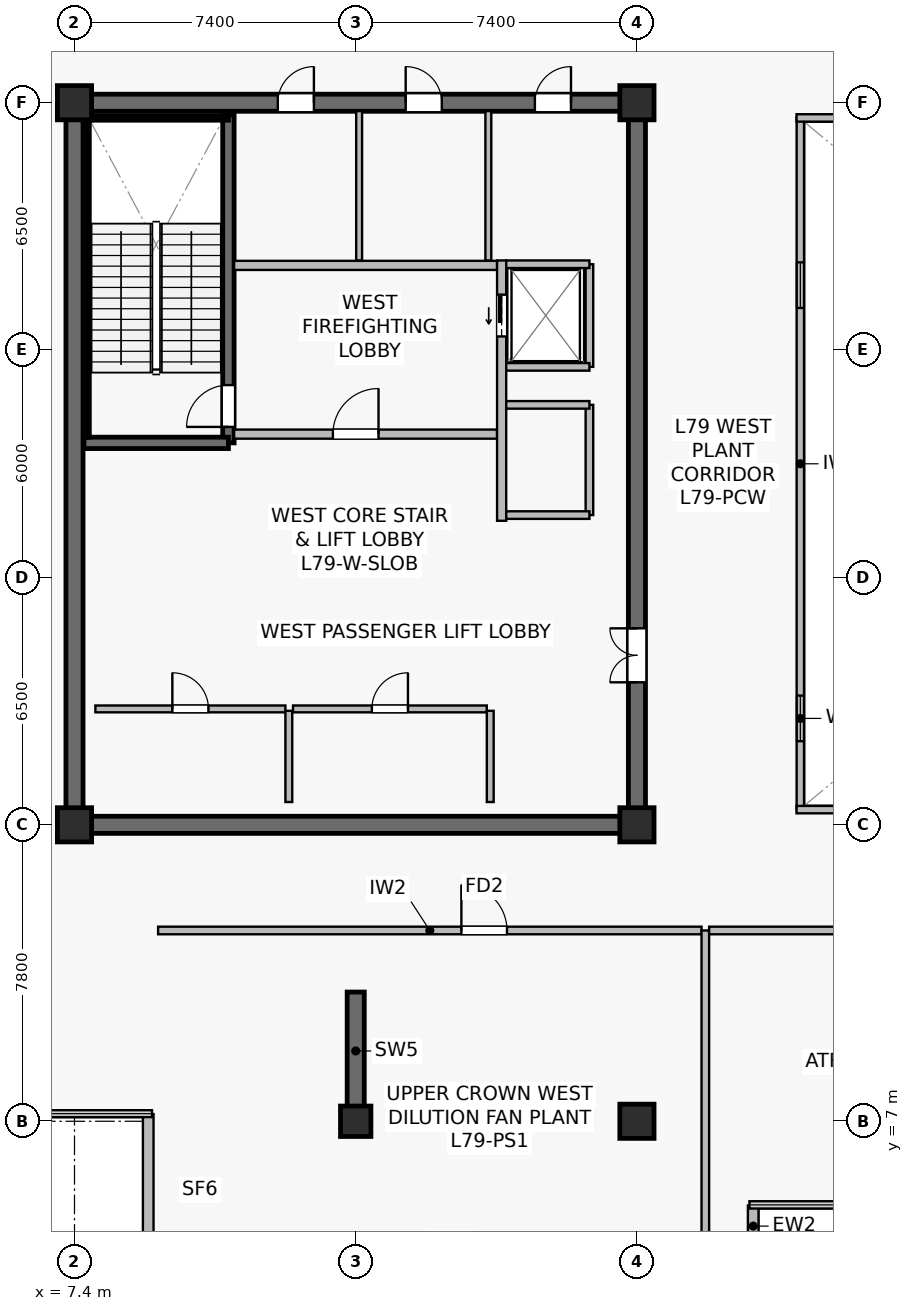
"""IFC4 building model, lengths in metres.
Left out: names, types, materials, properties, quantities, classifications, styles, units other than length and angle.
Written with IfcOpenShell. Run it as: python <this file> out.ifc"""

import sys

from ifc_helpers import new_model, si_unit, direction, frame, frame_2d, origin, origin_2d, place, context, subcontext, project, spatial, rectangle, extrude, source, transform, mapped, element, fill, save


model = new_model("IFC4")
c1 = context("Model", 3, precision=1e-05, world=origin(), true_north=direction((0.0, 1.0)))
c2 = subcontext(c1, "Body", "Model", "MODEL_VIEW")
j1 = project(units=[si_unit("LENGTHUNIT", "METRE"), si_unit("PLANEANGLEUNIT", "RADIAN")], contexts=[c1])
p1 = place(None, origin())
s1 = spatial("IfcSite", under=j1, at=p1, CompositionType="ELEMENT")
p2 = place(p1, origin())
s2 = spatial("IfcBuilding", under=s1, at=p2, CompositionType="ELEMENT")
p3 = place(p2, frame((0.0, 0.0, 332.4)))
s3 = spatial("IfcBuildingStorey", under=s2, at=p3, CompositionType="ELEMENT", Elevation=332.4)
p4 = place(p3, frame((7.175, 14.8, 0.0), z_axis=(0.0, 0.0, 1.0), x_axis=(1.0, 0.0, 0.0)))
e1 = element("IfcWall", 1, at=p4, inside=s3, PredefinedType="SHEAR", context=c2, shape_type="SweptSolid", body=[
    extrude(rectangle(XDim=15.25, YDim=0.45, at=frame_2d((7.625, 0.0))), origin(), (0.0, 0.0, 1.0), 5.12),
])
p5 = place(p3, frame((7.175, 33.8, 0.0), z_axis=(0.0, 0.0, 1.0), x_axis=(1.0, 0.0, 0.0)))
e2 = element("IfcWall", 2, at=p5, inside=s3, PredefinedType="SHEAR", context=c2, shape_type="SweptSolid", body=[
    extrude(rectangle(XDim=15.25, YDim=0.45, at=frame_2d((7.625, 0.0))), origin(), (0.0, 0.0, 1.0), 5.12),
])
p6 = place(p5, frame((5.575, 0.0, 0.0)))
e3 = element("IfcOpeningElement", 3, at=p6, cuts=e2, PredefinedType="OPENING", context=c2, shape_type="SweptSolid", body=[
    extrude(rectangle(XDim=0.95, YDim=2.15, at=frame_2d((0.475, 1.075))), frame((0.0, 0.235, 0.0), z_axis=(0.0, -1.0, 0.0), x_axis=(1.0, 0.0, 0.0)), (0.0, 0.0, 1.0), 0.47),
])
p7 = place(p5, frame((8.94, 0.0, 0.0)))
e4 = element("IfcOpeningElement", 4, at=p7, cuts=e2, PredefinedType="OPENING", context=c2, shape_type="SweptSolid", body=[
    extrude(rectangle(XDim=0.95, YDim=2.15, at=frame_2d((0.475, 1.075))), frame((0.0, 0.235, 0.0), z_axis=(0.0, -1.0, 0.0), x_axis=(1.0, 0.0, 0.0)), (0.0, 0.0, 1.0), 0.47),
])
p8 = place(p5, frame((12.34, 0.0, 0.0)))
e5 = element("IfcOpeningElement", 5, at=p8, cuts=e2, PredefinedType="OPENING", context=c2, shape_type="SweptSolid", body=[
    extrude(rectangle(XDim=0.95, YDim=2.15, at=frame_2d((0.475, 1.075))), frame((0.0, 0.235, 0.0), z_axis=(0.0, -1.0, 0.0), x_axis=(1.0, 0.0, 0.0)), (0.0, 0.0, 1.0), 0.47),
])
p9 = place(p3, frame((7.4, 15.025, 0.0), z_axis=(0.0, 0.0, 1.0), x_axis=(0.0, 1.0, 0.0)))
e6 = element("IfcWall", 6, at=p9, inside=s3, PredefinedType="SHEAR", context=c2, shape_type="SweptSolid", body=[
    extrude(rectangle(XDim=18.55, YDim=0.45, at=frame_2d((9.275, 0.0))), origin(), (0.0, 0.0, 1.0), 5.12),
])
p10 = place(p3, frame((22.2, 15.025, 0.0), z_axis=(0.0, 0.0, 1.0), x_axis=(0.0, 1.0, 0.0)))
e7 = element("IfcWall", 7, at=p10, inside=s3, PredefinedType="SHEAR", context=c2, shape_type="SweptSolid", body=[
    extrude(rectangle(XDim=18.55, YDim=0.45, at=frame_2d((9.275, 0.0))), origin(), (0.0, 0.0, 1.0), 5.12),
])
p11 = place(p10, frame((3.525, 0.0, 0.0)))
e8 = element("IfcOpeningElement", 8, at=p11, cuts=e7, PredefinedType="OPENING", context=c2, shape_type="SweptSolid", body=[
    extrude(rectangle(XDim=1.42, YDim=2.2, at=frame_2d((0.71, 1.1))), frame((0.0, 0.235, 0.0), z_axis=(0.0, -1.0, 0.0), x_axis=(1.0, 0.0, 0.0)), (0.0, 0.0, 1.0), 0.47),
])
p12 = place(p3, frame((11.45, 24.85, 0.0), z_axis=(0.0, 0.0, 1.0), x_axis=(0.0, 1.0, 0.0)))
e9 = element("IfcWall", 9, at=p12, inside=s3, PredefinedType="SHEAR", context=c2, shape_type="SweptSolid", body=[
    extrude(rectangle(XDim=8.63, YDim=0.3, at=frame_2d((4.315, 0.0))), origin(), (0.0, 0.0, 1.0), 5.12),
])
p13 = place(p12, frame((0.42, 0.0, 0.0)))
e10 = element("IfcOpeningElement", 10, at=p13, cuts=e9, PredefinedType="OPENING", context=c2, shape_type="SweptSolid", body=[
    extrude(rectangle(XDim=1.1, YDim=2.15, at=frame_2d((0.55, 1.075))), frame((0.0, 0.16, 0.0), z_axis=(0.0, -1.0, 0.0), x_axis=(1.0, 0.0, 0.0)), (0.0, 0.0, 1.0), 0.32),
])
p14 = place(p3, frame((7.65, 24.85, 0.0), z_axis=(0.0, 0.0, 1.0), x_axis=(1.0, 0.0, 0.0)))
e11 = element("IfcWall", 11, at=p14, inside=s3, PredefinedType="SHEAR", context=c2, shape_type="SweptSolid", body=[
    extrude(rectangle(XDim=3.8, YDim=0.3, at=frame_2d((1.9, 0.0))), origin(), (0.0, 0.0, 1.0), 5.12),
])
p15 = place(p3, frame((7.73, 33.4, 0.0), z_axis=(0.0, 0.0, 1.0), x_axis=(1.0, 0.0, 0.0)))
e12 = element("IfcWall", 12, at=p15, inside=s3, PredefinedType="SOLIDWALL", context=c2, shape_type="SweptSolid", body=[
    extrude(rectangle(XDim=3.72, YDim=0.12, at=frame_2d((1.86, 0.0))), origin(), (0.0, 0.0, 1.0), 5.12),
])
p16 = place(p3, frame((7.73, 25.0, 0.0), z_axis=(0.0, 0.0, 1.0), x_axis=(0.0, 1.0, 0.0)))
e13 = element("IfcWall", 13, at=p16, inside=s3, PredefinedType="SOLIDWALL", context=c2, shape_type="SweptSolid", body=[
    extrude(rectangle(XDim=8.32, YDim=0.12, at=frame_2d((4.16, 0.0))), origin(), (0.0, 0.0, 1.0), 5.12),
])
p17 = place(p3, frame((14.8, 7.3, 0.0), z_axis=(0.0, 0.0, 1.0), x_axis=(0.0, 1.0, 0.0)))
e14 = element("IfcWall", 14, at=p17, inside=s3, PredefinedType="SHEAR", context=c2, shape_type="SweptSolid", body=[
    extrude(rectangle(XDim=3.1, YDim=0.45, at=frame_2d((1.55, 0.0))), origin(), (0.0, 0.0, 1.0), 5.12),
])
m1 = source(origin(), c2, "Body", "SweptSolid", [
    extrude(rectangle(XDim=0.8, YDim=0.8, at=origin_2d()), origin(), (0.0, 0.0, 1.0), 5.4),
])
p18 = place(p3, frame((14.8, 7.0, 0.0), z_axis=(0.0, 0.0, 1.0), x_axis=(1.0, 0.0, 0.0)))
e15 = element("IfcColumn", 15, at=p18, inside=s3, PredefinedType="COLUMN", context=c2, shape_type="MappedRepresentation", body=[
    mapped(m1, transform((0.0, 0.0, 0.0), scale=1.0)),
])
m2 = source(origin(), c2, "Body", "SweptSolid", [
    extrude(rectangle(XDim=0.9, YDim=0.9, at=origin_2d()), origin(), (0.0, 0.0, 1.0), 5.4),
])
for number, where, z_axis, x_axis in (
    (16, (22.2, 7.0, 0.0), (0.0, 0.0, 1.0), (1.0, 0.0, 0.0)),
    (17, (7.4, 14.8, 0.0), (0.0, 0.0, 1.0), (1.0, 0.0, 0.0)),
    (18, (22.2, 14.8, 0.0), (0.0, 0.0, 1.0), (1.0, 0.0, 0.0)),
    (19, (7.4, 33.8, 0.0), (0.0, 0.0, 1.0), (1.0, 0.0, 0.0)),
    (20, (22.2, 33.8, 0.0), (0.0, 0.0, 1.0), (1.0, 0.0, 0.0)),
):
    element("IfcColumn", number, at=place(p3, frame(where, z_axis=z_axis, x_axis=x_axis)), inside=s3, PredefinedType="COLUMN", context=c2, shape_type="MappedRepresentation", body=[
        mapped(m2, transform((0.0, 0.0, 0.0), scale=1.0)),
    ])
p19 = place(p3, frame((25.26, 3.7, 0.0), z_axis=(0.0, 0.0, 1.0), x_axis=(0.0, 1.0, 0.0)))
e21 = element("IfcWall", 21, at=p19, inside=s3, PredefinedType="STANDARD", context=c2, shape_type="SweptSolid", body=[
    extrude(rectangle(XDim=1.083, YDim=0.28, at=frame_2d((0.542, 0.0))), origin(), (0.0, 0.0, 1.0), 5.12),
])
p20 = place(p3, frame((9.34, 7.188, 0.0), z_axis=(0.0, 0.0, 1.0), x_axis=(0.0, -1.0, 0.0)))
e22 = element("IfcWall", 22, at=p20, inside=s3, PredefinedType="STANDARD", context=c2, shape_type="SweptSolid", body=[
    extrude(rectangle(XDim=3.488, YDim=0.28, at=frame_2d((1.744, 0.0))), origin(), (0.0, 0.0, 1.0), 5.12),
])
p21 = place(p3, frame((11.6, 25.08, 0.0), z_axis=(0.0, 0.0, 1.0), x_axis=(1.0, 0.0, 0.0)))
e23 = element("IfcWall", 23, at=p21, inside=s3, PredefinedType="SOLIDWALL", context=c2, shape_type="SweptSolid", body=[
    extrude(rectangle(XDim=6.92, YDim=0.24, at=frame_2d((3.46, 0.0))), origin(), (0.0, 0.0, 1.0), 4.355),
])
p22 = place(p21, frame((2.6, 0.0, 0.0)))
e24 = element("IfcOpeningElement", 24, at=p22, cuts=e23, PredefinedType="OPENING", context=c2, shape_type="SweptSolid", body=[
    extrude(rectangle(XDim=1.2, YDim=2.16, at=frame_2d((0.6, 1.08))), frame((0.0, 0.13, 0.0), z_axis=(0.0, -1.0, 0.0), x_axis=(1.0, 0.0, 0.0)), (0.0, 0.0, 1.0), 0.26),
])
p23 = place(p3, frame((11.6, 29.52, 0.0), z_axis=(0.0, 0.0, 1.0), x_axis=(1.0, 0.0, 0.0)))
e25 = element("IfcWall", 25, at=p23, inside=s3, PredefinedType="SOLIDWALL", context=c2, shape_type="SweptSolid", body=[
    extrude(rectangle(XDim=6.92, YDim=0.24, at=frame_2d((3.46, 0.0))), origin(), (0.0, 0.0, 1.0), 4.355),
])
p24 = place(p3, frame((18.64, 22.8, 0.0), z_axis=(0.0, 0.0, 1.0), x_axis=(0.0, 1.0, 0.0)))
e26 = element("IfcWall", 26, at=p24, inside=s3, PredefinedType="SOLIDWALL", context=c2, shape_type="SweptSolid", body=[
    extrude(rectangle(XDim=6.85, YDim=0.24, at=frame_2d((3.425, 0.0))), origin(), (0.0, 0.0, 1.0), 4.255),
])
p25 = place(p24, frame((4.85, 0.0, 0.0)))
e27 = element("IfcOpeningElement", 27, at=p25, cuts=e26, PredefinedType="OPENING", context=c2, shape_type="SweptSolid", body=[
    extrude(rectangle(XDim=1.1, YDim=2.22, at=frame_2d((0.55, 1.11))), frame((0.0, 0.13, 0.0), z_axis=(0.0, -1.0, 0.0), x_axis=(1.0, 0.0, 0.0)), (0.0, 0.0, 1.0), 0.26),
])
p26 = place(p3, frame((20.95, 26.85, 0.0), z_axis=(0.0, 0.0, 1.0), x_axis=(0.0, 1.0, 0.0)))
e28 = element("IfcWall", 28, at=p26, inside=s3, PredefinedType="SOLIDWALL", context=c2, shape_type="SweptSolid", body=[
    extrude(rectangle(XDim=2.7, YDim=0.2, at=frame_2d((1.35, 0.0))), origin(), (0.0, 0.0, 1.0), 5.12),
])
p27 = place(p3, frame((18.76, 29.55, 0.0), z_axis=(0.0, 0.0, 1.0), x_axis=(1.0, 0.0, 0.0)))
e29 = element("IfcWall", 29, at=p27, inside=s3, PredefinedType="SOLIDWALL", context=c2, shape_type="SweptSolid", body=[
    extrude(rectangle(XDim=2.19, YDim=0.2, at=frame_2d((1.095, 0.0))), origin(), (0.0, 0.0, 1.0), 5.12),
])
p28 = place(p3, frame((18.76, 26.85, 0.0), z_axis=(0.0, 0.0, 1.0), x_axis=(1.0, 0.0, 0.0)))
e30 = element("IfcWall", 30, at=p28, inside=s3, PredefinedType="SOLIDWALL", context=c2, shape_type="SweptSolid", body=[
    extrude(rectangle(XDim=2.19, YDim=0.2, at=frame_2d((1.095, 0.0))), origin(), (0.0, 0.0, 1.0), 4.517),
])
p29 = place(p3, frame((20.95, 22.95, 0.0), z_axis=(0.0, 0.0, 1.0), x_axis=(0.0, 1.0, 0.0)))
e31 = element("IfcWall", 31, at=p29, inside=s3, PredefinedType="SOLIDWALL", context=c2, shape_type="SweptSolid", body=[
    extrude(rectangle(XDim=2.9, YDim=0.2, at=frame_2d((1.45, 0.0))), origin(), (0.0, 0.0, 1.0), 4.255),
])
for number, where, z_axis, x_axis in (
    (32, (18.76, 25.85, 0.0), (0.0, 0.0, 1.0), (1.0, 0.0, 0.0)),
    (33, (18.76, 22.95, 0.0), (0.0, 0.0, 1.0), (1.0, 0.0, 0.0)),
):
    element("IfcWall", number, at=place(p3, frame(where, z_axis=z_axis, x_axis=x_axis)), inside=s3, PredefinedType="SOLIDWALL", context=c2, shape_type="SweptSolid", body=[
        extrude(rectangle(XDim=2.19, YDim=0.2, at=frame_2d((1.095, 0.0))), origin(), (0.0, 0.0, 1.0), 5.12),
    ])
p30 = place(p3, frame((7.95, 17.85, 0.0), z_axis=(0.0, 0.0, 1.0), x_axis=(1.0, 0.0, 0.0)))
e34 = element("IfcWall", 34, at=p30, inside=s3, PredefinedType="SOLIDWALL", context=c2, shape_type="SweptSolid", body=[
    extrude(rectangle(XDim=5.0, YDim=0.18, at=frame_2d((2.5, 0.0))), origin(), (0.0, 0.0, 1.0), 5.12),
])
p31 = place(p30, frame((2.025, 0.0, 0.0)))
e35 = element("IfcOpeningElement", 35, at=p31, cuts=e34, PredefinedType="OPENING", context=c2, shape_type="SweptSolid", body=[
    extrude(rectangle(XDim=0.95, YDim=2.15, at=frame_2d((0.475, 1.075))), frame((0.0, 0.1, 0.0), z_axis=(0.0, -1.0, 0.0), x_axis=(1.0, 0.0, 0.0)), (0.0, 0.0, 1.0), 0.2),
])
p32 = place(p3, frame((13.04, 15.4, 0.0), z_axis=(0.0, 0.0, 1.0), x_axis=(0.0, 1.0, 0.0)))
e36 = element("IfcWall", 36, at=p32, inside=s3, PredefinedType="SOLIDWALL", context=c2, shape_type="SweptSolid", body=[
    extrude(rectangle(XDim=2.4, YDim=0.18, at=frame_2d((1.2, 0.0))), origin(), (0.0, 0.0, 1.0), 5.12),
])
p33 = place(p3, frame((13.15, 17.85, 0.0), z_axis=(0.0, 0.0, 1.0), x_axis=(1.0, 0.0, 0.0)))
e37 = element("IfcWall", 37, at=p33, inside=s3, PredefinedType="SOLIDWALL", context=c2, shape_type="SweptSolid", body=[
    extrude(rectangle(XDim=5.1, YDim=0.18, at=frame_2d((2.55, 0.0))), origin(), (0.0, 0.0, 1.0), 4.355),
])
p34 = place(p33, frame((2.075, 0.0, 0.0)))
e38 = element("IfcOpeningElement", 38, at=p34, cuts=e37, PredefinedType="OPENING", context=c2, shape_type="SweptSolid", body=[
    extrude(rectangle(XDim=0.95, YDim=2.15, at=frame_2d((0.475, 1.075))), frame((0.0, 0.1, 0.0), z_axis=(0.0, -1.0, 0.0), x_axis=(1.0, 0.0, 0.0)), (0.0, 0.0, 1.0), 0.2),
])
p35 = place(p3, frame((18.34, 15.4, 0.0), z_axis=(0.0, 0.0, 1.0), x_axis=(0.0, 1.0, 0.0)))
e39 = element("IfcWall", 39, at=p35, inside=s3, PredefinedType="SOLIDWALL", context=c2, shape_type="SweptSolid", body=[
    extrude(rectangle(XDim=2.4, YDim=0.18, at=frame_2d((1.2, 0.0))), origin(), (0.0, 0.0, 1.0), 5.12),
])
p36 = place(p3, frame((14.89, 29.65, 0.0), z_axis=(0.0, 0.0, 1.0), x_axis=(0.0, 1.0, 0.0)))
e40 = element("IfcWall", 40, at=p36, inside=s3, PredefinedType="PLUMBINGWALL", context=c2, shape_type="SweptSolid", body=[
    extrude(rectangle(XDim=3.93, YDim=0.155, at=frame_2d((1.965, 0.0))), origin(), (0.0, 0.0, 1.0), 4.355),
])
p37 = place(p3, frame((18.29, 29.65, 0.0), z_axis=(0.0, 0.0, 1.0), x_axis=(0.0, 1.0, 0.0)))
e41 = element("IfcWall", 41, at=p37, inside=s3, PredefinedType="PLUMBINGWALL", context=c2, shape_type="SweptSolid", body=[
    extrude(rectangle(XDim=3.93, YDim=0.155, at=frame_2d((1.965, 0.0))), origin(), (0.0, 0.0, 1.0), 5.12),
])
p38 = place(p3, frame((26.5, 15.2, 0.0), z_axis=(0.0, 0.0, 1.0), x_axis=(0.0, 1.0, 0.0)))
e42 = element("IfcWall", 42, at=p38, inside=s3, PredefinedType="SOLIDWALL", context=c2, shape_type="SweptSolid", body=[
    extrude(rectangle(XDim=18.2, YDim=0.195, at=frame_2d((9.1, 0.0))), origin(), (0.0, 0.0, 1.0), 5.12),
])
p39 = place(p38, frame((1.8, 0.0, 0.9)))
e43 = element("IfcOpeningElement", 43, at=p39, cuts=e42, PredefinedType="OPENING", context=c2, shape_type="SweptSolid", body=[
    extrude(rectangle(XDim=1.2, YDim=1.35, at=frame_2d((0.6, 0.675))), frame((0.0, 0.107, 0.0), z_axis=(0.0, -1.0, 0.0), x_axis=(1.0, 0.0, 0.0)), (0.0, 0.0, 1.0), 0.215),
])
p40 = place(p38, frame((13.2, 0.0, 0.9)))
e44 = element("IfcOpeningElement", 44, at=p40, cuts=e42, PredefinedType="OPENING", context=c2, shape_type="SweptSolid", body=[
    extrude(rectangle(XDim=1.2, YDim=1.35, at=frame_2d((0.6, 0.675))), frame((0.0, 0.107, 0.0), z_axis=(0.0, -1.0, 0.0), x_axis=(1.0, 0.0, 0.0)), (0.0, 0.0, 1.0), 0.215),
])
for number, where, z_axis, x_axis in (
    (45, (26.4, 15.2, 0.0), (0.0, 0.0, 1.0), (1.0, 0.0, 0.0)),
    (46, (26.4, 33.4, 0.0), (0.0, 0.0, 1.0), (1.0, 0.0, 0.0)),
):
    element("IfcWall", number, at=place(p3, frame(where, z_axis=z_axis, x_axis=x_axis)), inside=s3, PredefinedType="SOLIDWALL", context=c2, shape_type="SweptSolid", body=[
        extrude(rectangle(XDim=22.0, YDim=0.195, at=frame_2d((11.0, 0.0))), origin(), (0.0, 0.0, 1.0), 5.12),
    ])
p41 = place(p3, frame((9.6, 12.02, 0.0), z_axis=(0.0, 0.0, 1.0), x_axis=(1.0, 0.0, 0.0)))
e47 = element("IfcWall", 47, at=p41, inside=s3, PredefinedType="SOLIDWALL", context=c2, shape_type="SweptSolid", body=[
    extrude(rectangle(XDim=14.3, YDim=0.2, at=frame_2d((7.15, 0.0))), origin(), (0.0, 0.0, 1.0), 4.355),
])
p42 = place(p41, frame((7.981, 0.0, 0.0)))
e48 = element("IfcOpeningElement", 48, at=p42, cuts=e47, PredefinedType="OPENING", context=c2, shape_type="SweptSolid", body=[
    extrude(rectangle(XDim=1.2, YDim=2.16, at=frame_2d((0.6, 1.08))), frame((0.0, 0.11, 0.0), z_axis=(0.0, -1.0, 0.0), x_axis=(1.0, 0.0, 0.0)), (0.0, 0.0, 1.0), 0.22),
])
p43 = place(p3, frame((24.0, 3.81, 0.0), z_axis=(0.0, 0.0, 1.0), x_axis=(0.0, 1.0, 0.0)))
e49 = element("IfcWall", 49, at=p43, inside=s3, PredefinedType="SOLIDWALL", context=c2, shape_type="SweptSolid", body=[
    extrude(rectangle(XDim=8.21, YDim=0.2, at=frame_2d((4.105, 0.0))), origin(), (0.0, 0.0, 1.0), 4.455),
])
p44 = place(p3, frame((24.1, 12.02, 0.0), z_axis=(0.0, 0.0, 1.0), x_axis=(1.0, 0.0, 0.0)))
e50 = element("IfcWall", 50, at=p44, inside=s3, PredefinedType="SOLIDWALL", context=c2, shape_type="SweptSolid", body=[
    extrude(rectangle(XDim=14.8, YDim=0.2, at=frame_2d((7.4, 0.0))), origin(), (0.0, 0.0, 1.0), 4.355),
])
p45 = place(p44, frame((6.8, 0.0, 0.0)))
e51 = element("IfcOpeningElement", 51, at=p45, cuts=e50, PredefinedType="OPENING", context=c2, shape_type="SweptSolid", body=[
    extrude(rectangle(XDim=1.2, YDim=2.16, at=frame_2d((0.6, 1.08))), frame((0.0, 0.11, 0.0), z_axis=(0.0, -1.0, 0.0), x_axis=(1.0, 0.0, 0.0)), (0.0, 0.0, 1.0), 0.22),
])
m3 = source(origin(), c2, "Body", "SweptSolid", [
    extrude(rectangle(XDim=1.2, YDim=1.35, at=frame_2d((0.6, 0.675))), frame((0.0, 0.03, 0.0), z_axis=(0.0, -1.0, 0.0), x_axis=(1.0, 0.0, 0.0)), (0.0, 0.0, 1.0), 0.06),
])
p46 = place(p39, origin())
e52 = element("IfcWindow", 52, at=p46, inside=s3, PartitioningType="SINGLE_PANEL", PredefinedType="WINDOW", context=c2, shape_type="MappedRepresentation", body=[
    mapped(m3, transform((0.0, 0.0, 0.0), scale=1.0)),
])
fill(e43, e52)
p47 = place(p40, origin())
e53 = element("IfcWindow", 53, at=p47, inside=s3, PartitioningType="SINGLE_PANEL", PredefinedType="WINDOW", context=c2, shape_type="MappedRepresentation", body=[
    mapped(m3, transform((0.0, 0.0, 0.0), scale=1.0)),
])
fill(e44, e53)
m4 = source(origin(), c2, "Body", "SweptSolid", [
    extrude(rectangle(XDim=1.1, YDim=2.15, at=frame_2d((0.55, 1.075))), frame((0.0, 0.025, 0.0), z_axis=(0.0, -1.0, 0.0), x_axis=(1.0, 0.0, 0.0)), (0.0, 0.0, 1.0), 0.05),
])
p48 = place(p13, origin())
e54 = element("IfcDoor", 54, at=p48, inside=s3, OperationType="SINGLE_SWING_LEFT", PredefinedType="DOOR", context=c2, shape_type="MappedRepresentation", body=[
    mapped(m4, transform((0.0, 0.0, 0.0), scale=1.0)),
])
fill(e10, e54)
m5 = source(origin(), c2, "Body", "SweptSolid", [
    extrude(rectangle(XDim=1.2, YDim=2.16, at=frame_2d((0.6, 1.08))), frame((0.0, 0.025, 0.0), z_axis=(0.0, -1.0, 0.0), x_axis=(1.0, 0.0, 0.0)), (0.0, 0.0, 1.0), 0.05),
])
p49 = place(p22, origin())
e55 = element("IfcDoor", 55, at=p49, inside=s3, OperationType="SINGLE_SWING_RIGHT", PredefinedType="DOOR", context=c2, shape_type="MappedRepresentation", body=[
    mapped(m5, transform((0.0, 0.0, 0.0), scale=1.0)),
])
fill(e24, e55)
m6 = source(origin(), c2, "Body", "SweptSolid", [
    extrude(rectangle(XDim=1.1, YDim=2.22, at=frame_2d((0.55, 1.11))), frame((0.0, 0.025, 0.0), z_axis=(0.0, -1.0, 0.0), x_axis=(1.0, 0.0, 0.0)), (0.0, 0.0, 1.0), 0.05),
])
p50 = place(p25, origin())
e56 = element("IfcDoor", 56, at=p50, inside=s3, OperationType="SLIDING_TO_LEFT", PredefinedType="USERDEFINED", context=c2, shape_type="MappedRepresentation", body=[
    mapped(m6, transform((0.0, 0.0, 0.0), scale=1.0)),
])
fill(e27, e56)
m7 = source(origin(), c2, "Body", "SweptSolid", [
    extrude(rectangle(XDim=0.95, YDim=2.15, at=frame_2d((0.475, 1.075))), frame((0.0, 0.025, 0.0), z_axis=(0.0, -1.0, 0.0), x_axis=(1.0, 0.0, 0.0)), (0.0, 0.0, 1.0), 0.05),
])
p51 = place(p31, origin())
e57 = element("IfcDoor", 57, at=p51, inside=s3, OperationType="SINGLE_SWING_LEFT", PredefinedType="DOOR", context=c2, shape_type="MappedRepresentation", body=[
    mapped(m7, transform((0.0, 0.0, 0.0), scale=1.0)),
])
fill(e35, e57)
p52 = place(p34, origin())
e58 = element("IfcDoor", 58, at=p52, inside=s3, OperationType="SINGLE_SWING_RIGHT", PredefinedType="DOOR", context=c2, shape_type="MappedRepresentation", body=[
    mapped(m7, transform((0.0, 0.0, 0.0), scale=1.0)),
])
fill(e38, e58)
m8 = source(origin(), c2, "Body", "SweptSolid", [
    extrude(rectangle(XDim=1.42, YDim=2.2, at=frame_2d((0.71, 1.1))), frame((0.0, 0.025, 0.0), z_axis=(0.0, -1.0, 0.0), x_axis=(1.0, 0.0, 0.0)), (0.0, 0.0, 1.0), 0.05),
])
p53 = place(p11, origin())
e59 = element("IfcDoor", 59, at=p53, inside=s3, OperationType="DOUBLE_DOOR_SINGLE_SWING", PredefinedType="DOOR", context=c2, shape_type="MappedRepresentation", body=[
    mapped(m8, transform((0.0, 0.0, 0.0), scale=1.0)),
])
fill(e8, e59)
p54 = place(p6, origin())
e60 = element("IfcDoor", 60, at=p54, inside=s3, OperationType="SINGLE_SWING_RIGHT", PredefinedType="DOOR", context=c2, shape_type="MappedRepresentation", body=[
    mapped(m7, transform((0.0, 0.0, 0.0), scale=1.0)),
])
fill(e3, e60)
p55 = place(p7, origin())
e61 = element("IfcDoor", 61, at=p55, inside=s3, OperationType="SINGLE_SWING_LEFT", PredefinedType="DOOR", context=c2, shape_type="MappedRepresentation", body=[
    mapped(m7, transform((0.0, 0.0, 0.0), scale=1.0)),
])
fill(e4, e61)
p56 = place(p8, origin())
e62 = element("IfcDoor", 62, at=p56, inside=s3, OperationType="SINGLE_SWING_RIGHT", PredefinedType="DOOR", context=c2, shape_type="MappedRepresentation", body=[
    mapped(m7, transform((0.0, 0.0, 0.0), scale=1.0)),
])
fill(e5, e62)
p57 = place(p42, origin())
e63 = element("IfcDoor", 63, at=p57, inside=s3, OperationType="SINGLE_SWING_LEFT", PredefinedType="DOOR", context=c2, shape_type="MappedRepresentation", body=[
    mapped(m5, transform((0.0, 0.0, 0.0), scale=1.0)),
])
fill(e48, e63)
save(model, sys.argv[1])
